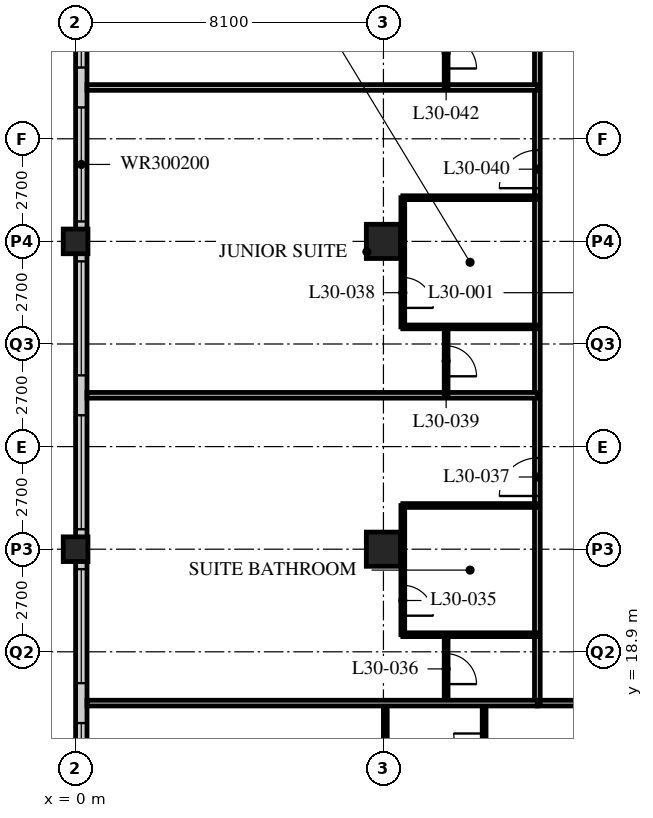
"""IFC4 building model, lengths in metres.
Left out: names, types, materials, properties, quantities, classifications, styles, units other than length and angle.
Written with IfcOpenShell. Run it as: python <this file> out.ifc"""

import sys

from ifc_helpers import new_model, si_unit, direction, frame, frame_2d, origin, origin_2d, place, context, subcontext, project, spatial, rectangle, hollow_rectangle, extrude, element, fill, save


model = new_model("IFC4")
c1 = context("Model", 3, precision=1e-05, world=origin(), true_north=direction((0.0, 1.0)))
c2 = subcontext(c1, "Body", "Model", "MODEL_VIEW")
j1 = project(units=[si_unit("LENGTHUNIT", "METRE"), si_unit("PLANEANGLEUNIT", "RADIAN")], contexts=[c1])
p1 = place(None, origin())
s1 = spatial("IfcSite", under=j1, at=p1, CompositionType="ELEMENT")
p2 = place(p1, origin())
s2 = spatial("IfcBuilding", under=s1, at=p2, CompositionType="ELEMENT")
p3 = place(p2, frame((0.0, 0.0, 120.4)))
s3 = spatial("IfcBuildingStorey", under=s2, at=p3, CompositionType="ELEMENT", Elevation=120.4)
for number, where, z_axis, x_axis in (
    (1, (0.0, 21.6, 0.0), (0.0, 0.0, 1.0), (1.0, 0.0, 0.0)),
    (2, (0.0, 29.7, 0.0), (0.0, 0.0, 1.0), (1.0, 0.0, 0.0)),
):
    element("IfcColumn", number, at=place(p3, frame(where, z_axis=z_axis, x_axis=x_axis)), inside=s3, PredefinedType="COLUMN", context=c2, shape_type="SweptSolid", body=[
        extrude(hollow_rectangle(XDim=0.65, YDim=0.65, WallThickness=0.055, at=origin_2d()), origin(), (0.0, 0.0, 1.0), 3.4),
    ])
for number, where, z_axis, x_axis in (
    (3, (8.1, 21.6, 0.0), (0.0, 0.0, 1.0), (1.0, 0.0, 0.0)),
    (4, (8.1, 29.7, 0.0), (0.0, 0.0, 1.0), (1.0, 0.0, 0.0)),
):
    element("IfcColumn", number, at=place(p3, frame(where, z_axis=z_axis, x_axis=x_axis)), inside=s3, PredefinedType="COLUMN", context=c2, shape_type="SweptSolid", body=[
        extrude(hollow_rectangle(XDim=0.9, YDim=0.9, WallThickness=0.09, at=origin_2d()), origin(), (0.0, 0.0, 1.0), 3.4),
    ])
p4 = place(p3, frame((0.15, 45.6, 0.0), z_axis=(0.0, 0.0, 1.0), x_axis=(0.0, -1.0, 0.0)))
e5 = element("IfcWall", 5, at=p4, inside=s3, PredefinedType="SOLIDWALL", context=c2, shape_type="SweptSolid", body=[
    extrude(rectangle(XDim=32.1, YDim=0.3, at=frame_2d((16.05, 0.0))), origin(), (0.0, 0.0, 1.0), 3.19),
])
p5 = place(p4, frame((0.225, 0.0, 0.9)))
e6 = element("IfcOpeningElement", 6, at=p5, cuts=e5, PredefinedType="OPENING", context=c2, shape_type="SweptSolid", body=[
    extrude(rectangle(XDim=3.0, YDim=2.0, at=frame_2d((1.5, 1.0))), frame((0.0, 0.16, 0.0), z_axis=(0.0, -1.0, 0.0), x_axis=(1.0, 0.0, 0.0)), (0.0, 0.0, 1.0), 0.32),
])
p6 = place(p4, frame((4.275, 0.0, 0.9)))
e7 = element("IfcOpeningElement", 7, at=p6, cuts=e5, PredefinedType="OPENING", context=c2, shape_type="SweptSolid", body=[
    extrude(rectangle(XDim=3.0, YDim=2.0, at=frame_2d((1.5, 1.0))), frame((0.0, 0.16, 0.0), z_axis=(0.0, -1.0, 0.0), x_axis=(1.0, 0.0, 0.0)), (0.0, 0.0, 1.0), 0.32),
])
p7 = place(p4, frame((8.325, 0.0, 0.9)))
e8 = element("IfcOpeningElement", 8, at=p7, cuts=e5, PredefinedType="OPENING", context=c2, shape_type="SweptSolid", body=[
    extrude(rectangle(XDim=3.0, YDim=2.0, at=frame_2d((1.5, 1.0))), frame((0.0, 0.16, 0.0), z_axis=(0.0, -1.0, 0.0), x_axis=(1.0, 0.0, 0.0)), (0.0, 0.0, 1.0), 0.32),
])
p8 = place(p4, frame((12.375, 0.0, 0.9)))
e9 = element("IfcOpeningElement", 9, at=p8, cuts=e5, PredefinedType="OPENING", context=c2, shape_type="SweptSolid", body=[
    extrude(rectangle(XDim=3.0, YDim=2.0, at=frame_2d((1.5, 1.0))), frame((0.0, 0.16, 0.0), z_axis=(0.0, -1.0, 0.0), x_axis=(1.0, 0.0, 0.0)), (0.0, 0.0, 1.0), 0.32),
])
p9 = place(p4, frame((16.425, 0.0, 0.9)))
e10 = element("IfcOpeningElement", 10, at=p9, cuts=e5, PredefinedType="OPENING", context=c2, shape_type="SweptSolid", body=[
    extrude(rectangle(XDim=3.0, YDim=2.0, at=frame_2d((1.5, 1.0))), frame((0.0, 0.16, 0.0), z_axis=(0.0, -1.0, 0.0), x_axis=(1.0, 0.0, 0.0)), (0.0, 0.0, 1.0), 0.32),
])
p10 = place(p4, frame((20.475, 0.0, 0.9)))
e11 = element("IfcOpeningElement", 11, at=p10, cuts=e5, PredefinedType="OPENING", context=c2, shape_type="SweptSolid", body=[
    extrude(rectangle(XDim=3.0, YDim=2.0, at=frame_2d((1.5, 1.0))), frame((0.0, 0.16, 0.0), z_axis=(0.0, -1.0, 0.0), x_axis=(1.0, 0.0, 0.0)), (0.0, 0.0, 1.0), 0.32),
])
p11 = place(p4, frame((24.525, 0.0, 0.9)))
e12 = element("IfcOpeningElement", 12, at=p11, cuts=e5, PredefinedType="OPENING", context=c2, shape_type="SweptSolid", body=[
    extrude(rectangle(XDim=3.0, YDim=2.0, at=frame_2d((1.5, 1.0))), frame((0.0, 0.16, 0.0), z_axis=(0.0, -1.0, 0.0), x_axis=(1.0, 0.0, 0.0)), (0.0, 0.0, 1.0), 0.32),
])
p12 = place(p4, frame((28.575, 0.0, 0.9)))
e13 = element("IfcOpeningElement", 13, at=p12, cuts=e5, PredefinedType="OPENING", context=c2, shape_type="SweptSolid", body=[
    extrude(rectangle(XDim=3.0, YDim=2.0, at=frame_2d((1.5, 1.0))), frame((0.0, 0.16, 0.0), z_axis=(0.0, -1.0, 0.0), x_axis=(1.0, 0.0, 0.0)), (0.0, 0.0, 1.0), 0.32),
])
p13 = place(p3, frame((12.15, 17.55, 0.0), z_axis=(0.0, 0.0, 1.0), x_axis=(1.0, 0.0, 0.0)))
e14 = element("IfcWall", 14, at=p13, inside=s3, PredefinedType="PARTITIONING", context=c2, shape_type="SweptSolid", body=[
    extrude(rectangle(XDim=32.4, YDim=0.15, at=frame_2d((16.2, 0.0))), origin(), (0.0, 0.0, 1.0), 3.19),
])
p14 = place(p13, frame((5.95, 0.0, 0.0)))
e15 = element("IfcOpeningElement", 15, at=p14, cuts=e14, PredefinedType="OPENING", context=c2, shape_type="SweptSolid", body=[
    extrude(rectangle(XDim=1.0, YDim=2.1, at=frame_2d((0.5, 1.05))), frame((0.0, 0.085, 0.0), z_axis=(0.0, -1.0, 0.0), x_axis=(1.0, 0.0, 0.0)), (0.0, 0.0, 1.0), 0.17),
])
p15 = place(p13, frame((17.725, 0.0, 0.0)))
e16 = element("IfcOpeningElement", 16, at=p15, cuts=e14, PredefinedType="OPENING", context=c2, shape_type="SweptSolid", body=[
    extrude(rectangle(XDim=1.0, YDim=2.1, at=frame_2d((0.5, 1.05))), frame((0.0, 0.085, 0.0), z_axis=(0.0, -1.0, 0.0), x_axis=(1.0, 0.0, 0.0)), (0.0, 0.0, 1.0), 0.17),
])
p16 = place(p13, frame((26.75, 0.0, 0.0)))
e17 = element("IfcOpeningElement", 17, at=p16, cuts=e14, PredefinedType="OPENING", context=c2, shape_type="SweptSolid", body=[
    extrude(rectangle(XDim=1.0, YDim=2.1, at=frame_2d((0.5, 1.05))), frame((0.0, 0.085, 0.0), z_axis=(0.0, -1.0, 0.0), x_axis=(1.0, 0.0, 0.0)), (0.0, 0.0, 1.0), 0.17),
])
p17 = place(p13, frame((1.525, 0.0, 0.0)))
e18 = element("IfcOpeningElement", 18, at=p17, cuts=e14, PredefinedType="OPENING", context=c2, shape_type="SweptSolid", body=[
    extrude(rectangle(XDim=1.0, YDim=2.1, at=frame_2d((0.5, 1.05))), frame((0.0, 0.085, 0.0), z_axis=(0.0, -1.0, 0.0), x_axis=(1.0, 0.0, 0.0)), (0.0, 0.0, 1.0), 0.17),
])
p18 = place(p13, frame((29.875, 0.0, 0.0)))
e19 = element("IfcOpeningElement", 19, at=p18, cuts=e14, PredefinedType="OPENING", context=c2, shape_type="SweptSolid", body=[
    extrude(rectangle(XDim=1.0, YDim=2.1, at=frame_2d((0.5, 1.05))), frame((0.0, 0.085, 0.0), z_axis=(0.0, -1.0, 0.0), x_axis=(1.0, 0.0, 0.0)), (0.0, 0.0, 1.0), 0.17),
])
p19 = place(p3, frame((12.15, 17.55, 0.0), z_axis=(0.0, 0.0, 1.0), x_axis=(0.0, 1.0, 0.0)))
e20 = element("IfcWall", 20, at=p19, inside=s3, PredefinedType="PARTITIONING", context=c2, shape_type="SweptSolid", body=[
    extrude(rectangle(XDim=28.35, YDim=0.15, at=frame_2d((14.175, 0.0))), origin(), (0.0, 0.0, 1.0), 3.19),
])
p20 = place(p19, frame((5.45, 0.0, 0.0)))
e21 = element("IfcOpeningElement", 21, at=p20, cuts=e20, PredefinedType="OPENING", context=c2, shape_type="SweptSolid", body=[
    extrude(rectangle(XDim=1.0, YDim=2.1, at=frame_2d((0.5, 1.05))), frame((0.0, 0.085, 0.0), z_axis=(0.0, -1.0, 0.0), x_axis=(1.0, 0.0, 0.0)), (0.0, 0.0, 1.0), 0.17),
])
p21 = place(p19, frame((13.55, 0.0, 0.0)))
e22 = element("IfcOpeningElement", 22, at=p21, cuts=e20, PredefinedType="OPENING", context=c2, shape_type="SweptSolid", body=[
    extrude(rectangle(XDim=1.0, YDim=2.1, at=frame_2d((0.5, 1.05))), frame((0.0, 0.085, 0.0), z_axis=(0.0, -1.0, 0.0), x_axis=(1.0, 0.0, 0.0)), (0.0, 0.0, 1.0), 0.17),
])
p22 = place(p19, frame((21.65, 0.0, 0.0)))
e23 = element("IfcOpeningElement", 23, at=p22, cuts=e20, PredefinedType="OPENING", context=c2, shape_type="SweptSolid", body=[
    extrude(rectangle(XDim=1.0, YDim=2.1, at=frame_2d((0.5, 1.05))), frame((0.0, 0.085, 0.0), z_axis=(0.0, -1.0, 0.0), x_axis=(1.0, 0.0, 0.0)), (0.0, 0.0, 1.0), 0.17),
])
p23 = place(p19, frame((26.75, 0.0, 0.0)))
e24 = element("IfcOpeningElement", 24, at=p23, cuts=e20, PredefinedType="OPENING", context=c2, shape_type="SweptSolid", body=[
    extrude(rectangle(XDim=1.0, YDim=2.1, at=frame_2d((0.5, 1.05))), frame((0.0, 0.085, 0.0), z_axis=(0.0, -1.0, 0.0), x_axis=(1.0, 0.0, 0.0)), (0.0, 0.0, 1.0), 0.17),
])
p24 = place(p3, frame((8.61, 19.35, 0.0), z_axis=(0.0, 0.0, 1.0), x_axis=(0.0, 1.0, 0.0)))
e25 = element("IfcWall", 25, at=p24, inside=s3, PredefinedType="PARTITIONING", context=c2, shape_type="SweptSolid", body=[
    extrude(rectangle(XDim=3.4, YDim=0.1, at=frame_2d((1.7, 0.0))), origin(), (0.0, 0.0, 1.0), 3.19),
])
p25 = place(p24, frame((0.5, 0.0, 0.0)))
e26 = element("IfcOpeningElement", 26, at=p25, cuts=e25, PredefinedType="OPENING", context=c2, shape_type="SweptSolid", body=[
    extrude(rectangle(XDim=0.8, YDim=2.1, at=frame_2d((0.4, 1.05))), frame((0.0, 0.06, 0.0), z_axis=(0.0, -1.0, 0.0), x_axis=(1.0, 0.0, 0.0)), (0.0, 0.0, 1.0), 0.12),
])
p26 = place(p3, frame((9.75, 17.55, 0.0), z_axis=(0.0, 0.0, 1.0), x_axis=(0.0, 1.0, 0.0)))
e27 = element("IfcWall", 27, at=p26, inside=s3, PredefinedType="PARTITIONING", context=c2, shape_type="SweptSolid", body=[
    extrude(rectangle(XDim=1.8, YDim=0.1, at=frame_2d((0.9, 0.0))), origin(), (0.0, 0.0, 1.0), 3.19),
])
p27 = place(p26, frame((0.5, 0.0, 0.0)))
e28 = element("IfcOpeningElement", 28, at=p27, cuts=e27, PredefinedType="OPENING", context=c2, shape_type="SweptSolid", body=[
    extrude(rectangle(XDim=0.8, YDim=2.1, at=frame_2d((0.4, 1.05))), frame((0.0, 0.06, 0.0), z_axis=(0.0, -1.0, 0.0), x_axis=(1.0, 0.0, 0.0)), (0.0, 0.0, 1.0), 0.12),
])
for number, where, z_axis, x_axis in (
    (29, (12.15, 19.35, 0.0), (0.0, 0.0, 1.0), (-1.0, 0.0, 0.0)),
    (30, (12.15, 22.75, 0.0), (0.0, 0.0, 1.0), (-1.0, 0.0, 0.0)),
):
    element("IfcWall", number, at=place(p3, frame(where, z_axis=z_axis, x_axis=x_axis)), inside=s3, PredefinedType="PARTITIONING", context=c2, shape_type="SweptSolid", body=[
        extrude(rectangle(XDim=3.54, YDim=0.1, at=frame_2d((1.77, 0.0))), origin(), (0.0, 0.0, 1.0), 3.19),
    ])
p28 = place(p3, frame((12.15, 25.65, 0.0), z_axis=(0.0, 0.0, 1.0), x_axis=(-1.0, 0.0, 0.0)))
e31 = element("IfcWall", 31, at=p28, inside=s3, PredefinedType="PARTITIONING", context=c2, shape_type="SweptSolid", body=[
    extrude(rectangle(XDim=11.85, YDim=0.15, at=frame_2d((5.925, 0.0))), origin(), (0.0, 0.0, 1.0), 3.19),
])
p29 = place(p3, frame((8.61, 27.45, 0.0), z_axis=(0.0, 0.0, 1.0), x_axis=(0.0, 1.0, 0.0)))
e32 = element("IfcWall", 32, at=p29, inside=s3, PredefinedType="PARTITIONING", context=c2, shape_type="SweptSolid", body=[
    extrude(rectangle(XDim=3.4, YDim=0.1, at=frame_2d((1.7, 0.0))), origin(), (0.0, 0.0, 1.0), 3.19),
])
p30 = place(p29, frame((0.5, 0.0, 0.0)))
e33 = element("IfcOpeningElement", 33, at=p30, cuts=e32, PredefinedType="OPENING", context=c2, shape_type="SweptSolid", body=[
    extrude(rectangle(XDim=0.8, YDim=2.1, at=frame_2d((0.4, 1.05))), frame((0.0, 0.06, 0.0), z_axis=(0.0, -1.0, 0.0), x_axis=(1.0, 0.0, 0.0)), (0.0, 0.0, 1.0), 0.12),
])
p31 = place(p3, frame((9.75, 25.65, 0.0), z_axis=(0.0, 0.0, 1.0), x_axis=(0.0, 1.0, 0.0)))
e34 = element("IfcWall", 34, at=p31, inside=s3, PredefinedType="PARTITIONING", context=c2, shape_type="SweptSolid", body=[
    extrude(rectangle(XDim=1.8, YDim=0.1, at=frame_2d((0.9, 0.0))), origin(), (0.0, 0.0, 1.0), 3.19),
])
p32 = place(p31, frame((0.5, 0.0, 0.0)))
e35 = element("IfcOpeningElement", 35, at=p32, cuts=e34, PredefinedType="OPENING", context=c2, shape_type="SweptSolid", body=[
    extrude(rectangle(XDim=0.8, YDim=2.1, at=frame_2d((0.4, 1.05))), frame((0.0, 0.06, 0.0), z_axis=(0.0, -1.0, 0.0), x_axis=(1.0, 0.0, 0.0)), (0.0, 0.0, 1.0), 0.12),
])
for number, where, z_axis, x_axis in (
    (36, (12.15, 27.45, 0.0), (0.0, 0.0, 1.0), (-1.0, 0.0, 0.0)),
    (37, (12.15, 30.85, 0.0), (0.0, 0.0, 1.0), (-1.0, 0.0, 0.0)),
):
    element("IfcWall", number, at=place(p3, frame(where, z_axis=z_axis, x_axis=x_axis)), inside=s3, PredefinedType="PARTITIONING", context=c2, shape_type="SweptSolid", body=[
        extrude(rectangle(XDim=3.54, YDim=0.1, at=frame_2d((1.77, 0.0))), origin(), (0.0, 0.0, 1.0), 3.19),
    ])
p33 = place(p3, frame((12.15, 33.75, 0.0), z_axis=(0.0, 0.0, 1.0), x_axis=(-1.0, 0.0, 0.0)))
e38 = element("IfcWall", 38, at=p33, inside=s3, PredefinedType="PARTITIONING", context=c2, shape_type="SweptSolid", body=[
    extrude(rectangle(XDim=11.85, YDim=0.15, at=frame_2d((5.925, 0.0))), origin(), (0.0, 0.0, 1.0), 3.19),
])
p34 = place(p3, frame((9.75, 33.75, 0.0), z_axis=(0.0, 0.0, 1.0), x_axis=(0.0, 1.0, 0.0)))
e39 = element("IfcWall", 39, at=p34, inside=s3, PredefinedType="PARTITIONING", context=c2, shape_type="SweptSolid", body=[
    extrude(rectangle(XDim=1.8, YDim=0.1, at=frame_2d((0.9, 0.0))), origin(), (0.0, 0.0, 1.0), 3.19),
])
p35 = place(p34, frame((0.5, 0.0, 0.0)))
e40 = element("IfcOpeningElement", 40, at=p35, cuts=e39, PredefinedType="OPENING", context=c2, shape_type="SweptSolid", body=[
    extrude(rectangle(XDim=0.8, YDim=2.1, at=frame_2d((0.4, 1.05))), frame((0.0, 0.06, 0.0), z_axis=(0.0, -1.0, 0.0), x_axis=(1.0, 0.0, 0.0)), (0.0, 0.0, 1.0), 0.12),
])
p36 = place(p3, frame((10.75, 17.55, 0.0), z_axis=(0.0, 0.0, 1.0), x_axis=(0.0, -1.0, 0.0)))
e41 = element("IfcWall", 41, at=p36, inside=s3, PredefinedType="PARTITIONING", context=c2, shape_type="SweptSolid", body=[
    extrude(rectangle(XDim=2.4, YDim=0.1, at=frame_2d((1.2, 0.0))), origin(), (0.0, 0.0, 1.0), 3.19),
])
p37 = place(p36, frame((0.8, 0.0, 0.0)))
e42 = element("IfcOpeningElement", 42, at=p37, cuts=e41, PredefinedType="OPENING", context=c2, shape_type="SweptSolid", body=[
    extrude(rectangle(XDim=0.8, YDim=2.1, at=frame_2d((0.4, 1.05))), frame((0.0, 0.06, 0.0), z_axis=(0.0, -1.0, 0.0), x_axis=(1.0, 0.0, 0.0)), (0.0, 0.0, 1.0), 0.12),
])
p38 = place(p3, frame((8.15, 17.55, 0.0), z_axis=(0.0, 0.0, 1.0), x_axis=(0.0, -1.0, 0.0)))
e43 = element("IfcWall", 43, at=p38, inside=s3, PredefinedType="PARTITIONING", context=c2, shape_type="SweptSolid", body=[
    extrude(rectangle(XDim=2.4, YDim=0.1, at=frame_2d((1.2, 0.0))), origin(), (0.0, 0.0, 1.0), 2.578),
])
p39 = place(p3, frame((0.3, 17.55, 0.0), z_axis=(0.0, 0.0, 1.0), x_axis=(1.0, 0.0, 0.0)))
e44 = element("IfcWall", 44, at=p39, inside=s3, PredefinedType="PARTITIONING", context=c2, shape_type="SweptSolid", body=[
    extrude(rectangle(XDim=11.85, YDim=0.15, at=frame_2d((5.925, 0.0))), origin(), (0.0, 0.0, 1.0), 3.19),
])
p40 = place(p7, origin())
e45 = element("IfcWindow", 45, at=p40, inside=s3, PartitioningType="SINGLE_PANEL", PredefinedType="WINDOW", context=c2, shape_type="SweptSolid", body=[
    extrude(rectangle(XDim=3.0, YDim=2.0, at=frame_2d((1.5, 1.0))), frame((0.0, 0.03, 0.0), z_axis=(0.0, -1.0, 0.0), x_axis=(1.0, 0.0, 0.0)), (0.0, 0.0, 1.0), 0.06),
])
fill(e8, e45)
p41 = place(p8, origin())
e46 = element("IfcWindow", 46, at=p41, inside=s3, PartitioningType="SINGLE_PANEL", PredefinedType="WINDOW", context=c2, shape_type="SweptSolid", body=[
    extrude(rectangle(XDim=3.0, YDim=2.0, at=frame_2d((1.5, 1.0))), frame((0.0, 0.03, 0.0), z_axis=(0.0, -1.0, 0.0), x_axis=(1.0, 0.0, 0.0)), (0.0, 0.0, 1.0), 0.06),
])
fill(e9, e46)
p42 = place(p9, origin())
e47 = element("IfcWindow", 47, at=p42, inside=s3, PartitioningType="SINGLE_PANEL", PredefinedType="WINDOW", context=c2, shape_type="SweptSolid", body=[
    extrude(rectangle(XDim=3.0, YDim=2.0, at=frame_2d((1.5, 1.0))), frame((0.0, 0.03, 0.0), z_axis=(0.0, -1.0, 0.0), x_axis=(1.0, 0.0, 0.0)), (0.0, 0.0, 1.0), 0.06),
])
fill(e10, e47)
p43 = place(p10, origin())
e48 = element("IfcWindow", 48, at=p43, inside=s3, PartitioningType="SINGLE_PANEL", PredefinedType="WINDOW", context=c2, shape_type="SweptSolid", body=[
    extrude(rectangle(XDim=3.0, YDim=2.0, at=frame_2d((1.5, 1.0))), frame((0.0, 0.03, 0.0), z_axis=(0.0, -1.0, 0.0), x_axis=(1.0, 0.0, 0.0)), (0.0, 0.0, 1.0), 0.06),
])
fill(e11, e48)
p44 = place(p11, origin())
e49 = element("IfcWindow", 49, at=p44, inside=s3, PartitioningType="SINGLE_PANEL", PredefinedType="WINDOW", context=c2, shape_type="SweptSolid", body=[
    extrude(rectangle(XDim=3.0, YDim=2.0, at=frame_2d((1.5, 1.0))), frame((0.0, 0.03, 0.0), z_axis=(0.0, -1.0, 0.0), x_axis=(1.0, 0.0, 0.0)), (0.0, 0.0, 1.0), 0.06),
])
fill(e12, e49)
p45 = place(p12, origin())
e50 = element("IfcWindow", 50, at=p45, inside=s3, PartitioningType="SINGLE_PANEL", PredefinedType="WINDOW", context=c2, shape_type="SweptSolid", body=[
    extrude(rectangle(XDim=3.0, YDim=2.0, at=frame_2d((1.5, 1.0))), frame((0.0, 0.03, 0.0), z_axis=(0.0, -1.0, 0.0), x_axis=(1.0, 0.0, 0.0)), (0.0, 0.0, 1.0), 0.06),
])
fill(e13, e50)
p46 = place(p25, origin())
e51 = element("IfcDoor", 51, at=p46, inside=s3, OperationType="SINGLE_SWING_RIGHT", PredefinedType="DOOR", context=c2, shape_type="SweptSolid", body=[
    extrude(rectangle(XDim=0.8, YDim=2.1, at=frame_2d((0.4, 1.05))), frame((0.0, 0.025, 0.0), z_axis=(0.0, -1.0, 0.0), x_axis=(1.0, 0.0, 0.0)), (0.0, 0.0, 1.0), 0.05),
])
fill(e26, e51)
p47 = place(p27, origin())
e52 = element("IfcDoor", 52, at=p47, inside=s3, OperationType="SINGLE_SWING_RIGHT", PredefinedType="DOOR", context=c2, shape_type="SweptSolid", body=[
    extrude(rectangle(XDim=0.8, YDim=2.1, at=frame_2d((0.4, 1.05))), frame((0.0, 0.025, 0.0), z_axis=(0.0, -1.0, 0.0), x_axis=(1.0, 0.0, 0.0)), (0.0, 0.0, 1.0), 0.05),
])
fill(e28, e52)
p48 = place(p20, origin())
e53 = element("IfcDoor", 53, at=p48, inside=s3, OperationType="SINGLE_SWING_LEFT", PredefinedType="DOOR", context=c2, shape_type="SweptSolid", body=[
    extrude(rectangle(XDim=1.0, YDim=2.1, at=frame_2d((0.5, 1.05))), frame((0.0, 0.025, 0.0), z_axis=(0.0, -1.0, 0.0), x_axis=(1.0, 0.0, 0.0)), (0.0, 0.0, 1.0), 0.05),
])
fill(e21, e53)
p49 = place(p30, origin())
e54 = element("IfcDoor", 54, at=p49, inside=s3, OperationType="SINGLE_SWING_RIGHT", PredefinedType="DOOR", context=c2, shape_type="SweptSolid", body=[
    extrude(rectangle(XDim=0.8, YDim=2.1, at=frame_2d((0.4, 1.05))), frame((0.0, 0.025, 0.0), z_axis=(0.0, -1.0, 0.0), x_axis=(1.0, 0.0, 0.0)), (0.0, 0.0, 1.0), 0.05),
])
fill(e33, e54)
p50 = place(p32, origin())
e55 = element("IfcDoor", 55, at=p50, inside=s3, OperationType="SINGLE_SWING_RIGHT", PredefinedType="DOOR", context=c2, shape_type="SweptSolid", body=[
    extrude(rectangle(XDim=0.8, YDim=2.1, at=frame_2d((0.4, 1.05))), frame((0.0, 0.025, 0.0), z_axis=(0.0, -1.0, 0.0), x_axis=(1.0, 0.0, 0.0)), (0.0, 0.0, 1.0), 0.05),
])
fill(e35, e55)
p51 = place(p21, origin())
e56 = element("IfcDoor", 56, at=p51, inside=s3, OperationType="SINGLE_SWING_LEFT", PredefinedType="DOOR", context=c2, shape_type="SweptSolid", body=[
    extrude(rectangle(XDim=1.0, YDim=2.1, at=frame_2d((0.5, 1.05))), frame((0.0, 0.025, 0.0), z_axis=(0.0, -1.0, 0.0), x_axis=(1.0, 0.0, 0.0)), (0.0, 0.0, 1.0), 0.05),
])
fill(e22, e56)
p52 = place(p35, origin())
e57 = element("IfcDoor", 57, at=p52, inside=s3, OperationType="SINGLE_SWING_RIGHT", PredefinedType="DOOR", context=c2, shape_type="SweptSolid", body=[
    extrude(rectangle(XDim=0.8, YDim=2.1, at=frame_2d((0.4, 1.05))), frame((0.0, 0.025, 0.0), z_axis=(0.0, -1.0, 0.0), x_axis=(1.0, 0.0, 0.0)), (0.0, 0.0, 1.0), 0.05),
])
fill(e40, e57)
p53 = place(p37, origin())
e58 = element("IfcDoor", 58, at=p53, inside=s3, OperationType="SINGLE_SWING_RIGHT", PredefinedType="DOOR", context=c2, shape_type="SweptSolid", body=[
    extrude(rectangle(XDim=0.8, YDim=2.1, at=frame_2d((0.4, 1.05))), frame((0.0, 0.025, 0.0), z_axis=(0.0, -1.0, 0.0), x_axis=(1.0, 0.0, 0.0)), (0.0, 0.0, 1.0), 0.05),
])
fill(e42, e58)
save(model, sys.argv[1])
